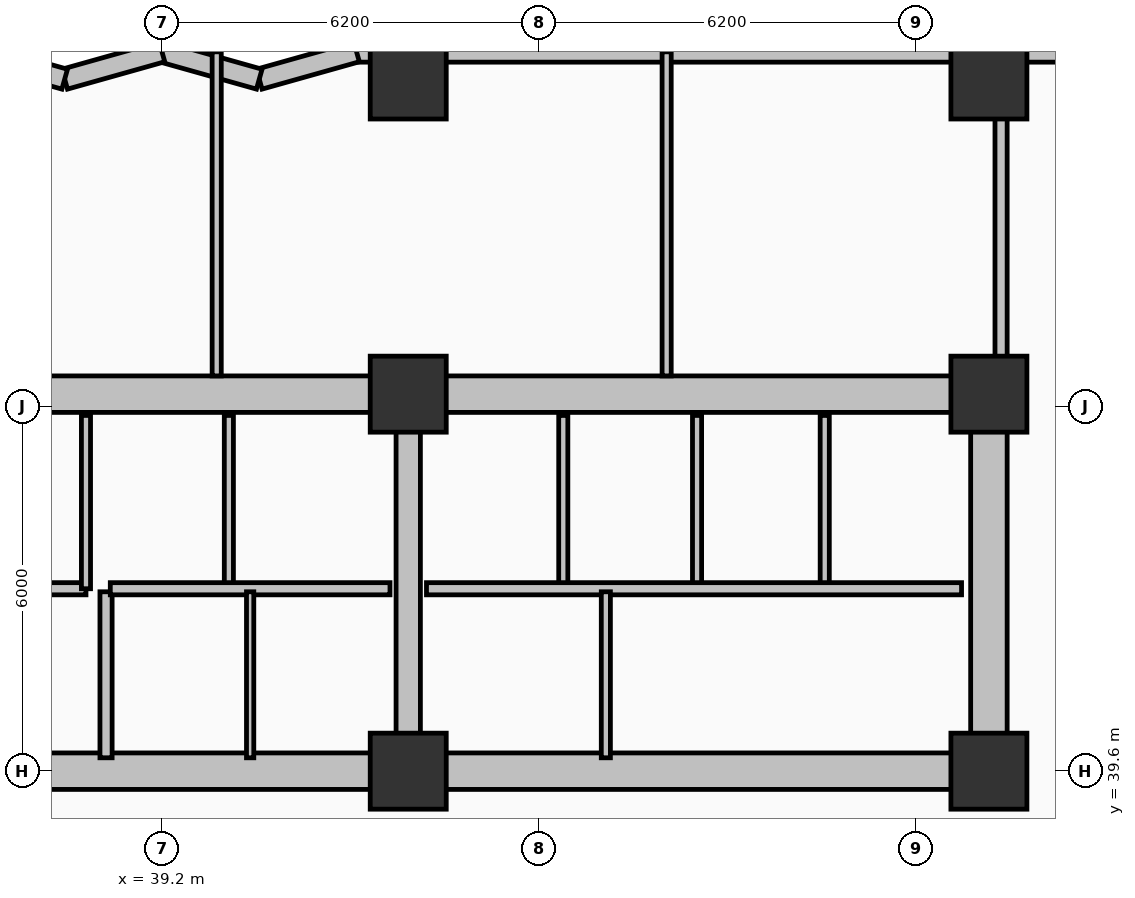
"""IFC4 building model, lengths in metres.
Left out: names, types, materials, properties, quantities, classifications, styles, units other than length and angle.
Written with IfcOpenShell. Run it as: python <this file> out.ifc"""

import sys

from ifc_helpers import new_model, si_unit, direction, frame, frame_2d, origin, origin_2d, place, context, subcontext, project, spatial, rectangle, extrude, element, fill, save


model = new_model("IFC4")
c1 = context("Model", 3, precision=1e-05, world=origin(), true_north=direction((0.0, 1.0)))
c2 = subcontext(c1, "Body", "Model", "MODEL_VIEW")
j1 = project(units=[si_unit("LENGTHUNIT", "METRE"), si_unit("PLANEANGLEUNIT", "RADIAN")], contexts=[c1])
p1 = place(None, origin())
s1 = spatial("IfcSite", under=j1, at=p1, CompositionType="ELEMENT")
p2 = place(p1, origin())
s2 = spatial("IfcBuilding", under=s1, at=p2, CompositionType="ELEMENT")
p3 = place(p2, frame((0.0, 0.0, 36.2)))
s3 = spatial("IfcBuildingStorey", under=s2, at=p3, CompositionType="ELEMENT", Elevation=36.2)
p4 = place(p3, frame((25.6, 45.8, 0.0), z_axis=(0.0, 0.0, 1.0), x_axis=(1.0, 0.0, 0.0)))
e1 = element("IfcWall", 1, at=p4, inside=s3, PredefinedType="SHEAR", context=c2, shape_type="SweptSolid", body=[
    extrude(rectangle(XDim=27.2, YDim=0.6, at=frame_2d((13.6, 0.0))), origin(), (0.0, 0.0, 1.0), 3.7),
])
p5 = place(p3, frame((52.8, 39.9, 0.0), z_axis=(0.0, 0.0, 1.0), x_axis=(0.0, 1.0, 0.0)))
e2 = element("IfcWall", 2, at=p5, inside=s3, PredefinedType="SHEAR", context=c2, shape_type="SweptSolid", body=[
    extrude(rectangle(XDim=5.6, YDim=0.6, at=frame_2d((2.8, 0.0))), origin(), (0.0, 0.0, 1.0), 3.7),
])
p6 = place(p3, frame((52.8, 39.6, 0.0), z_axis=(0.0, 0.0, 1.0), x_axis=(-1.0, 0.0, 0.0)))
e3 = element("IfcWall", 3, at=p6, inside=s3, PredefinedType="SHEAR", context=c2, shape_type="SweptSolid", body=[
    extrude(rectangle(XDim=27.2, YDim=0.6, at=frame_2d((13.6, 0.0))), origin(), (0.0, 0.0, 1.0), 3.7),
])
p7 = place(p6, frame((24.3, 0.0, 0.0)))
e4 = element("IfcOpeningElement", 4, at=p7, cuts=e3, PredefinedType="OPENING", context=c2, shape_type="SweptSolid", body=[
    extrude(rectangle(XDim=1.1, YDim=2.15, at=frame_2d((0.55, 1.075))), frame((0.0, 0.31, 0.0), z_axis=(0.0, -1.0, 0.0), x_axis=(1.0, 0.0, 0.0)), (0.0, 0.0, 1.0), 0.62),
])
p8 = place(p6, frame((21.85, 0.0, 0.0)))
e5 = element("IfcOpeningElement", 5, at=p8, cuts=e3, PredefinedType="OPENING", context=c2, shape_type="SweptSolid", body=[
    extrude(rectangle(XDim=0.85, YDim=2.1, at=frame_2d((0.425, 1.05))), frame((0.0, 0.31, 0.0), z_axis=(0.0, -1.0, 0.0), x_axis=(1.0, 0.0, 0.0)), (0.0, 0.0, 1.0), 0.62),
])
p9 = place(p6, frame((19.85, 0.0, 0.0)))
e6 = element("IfcOpeningElement", 6, at=p9, cuts=e3, PredefinedType="OPENING", context=c2, shape_type="SweptSolid", body=[
    extrude(rectangle(XDim=0.85, YDim=2.1, at=frame_2d((0.425, 1.05))), frame((0.0, 0.31, 0.0), z_axis=(0.0, -1.0, 0.0), x_axis=(1.0, 0.0, 0.0)), (0.0, 0.0, 1.0), 0.62),
])
p10 = place(p6, frame((15.1, 0.0, 0.0)))
e7 = element("IfcOpeningElement", 7, at=p10, cuts=e3, PredefinedType="OPENING", context=c2, shape_type="SweptSolid", body=[
    extrude(rectangle(XDim=1.2, YDim=2.15, at=frame_2d((0.6, 1.075))), frame((0.0, 0.31, 0.0), z_axis=(0.0, -1.0, 0.0), x_axis=(1.0, 0.0, 0.0)), (0.0, 0.0, 1.0), 0.62),
])
p11 = place(p6, frame((12.6, 0.0, 0.0)))
e8 = element("IfcOpeningElement", 8, at=p11, cuts=e3, PredefinedType="OPENING", context=c2, shape_type="SweptSolid", body=[
    extrude(rectangle(XDim=0.85, YDim=2.1, at=frame_2d((0.425, 1.05))), frame((0.0, 0.31, 0.0), z_axis=(0.0, -1.0, 0.0), x_axis=(1.0, 0.0, 0.0)), (0.0, 0.0, 1.0), 0.62),
])
p12 = place(p6, frame((10.85, 0.0, 0.0)))
e9 = element("IfcOpeningElement", 9, at=p12, cuts=e3, PredefinedType="OPENING", context=c2, shape_type="SweptSolid", body=[
    extrude(rectangle(XDim=0.85, YDim=2.1, at=frame_2d((0.425, 1.05))), frame((0.0, 0.31, 0.0), z_axis=(0.0, -1.0, 0.0), x_axis=(1.0, 0.0, 0.0)), (0.0, 0.0, 1.0), 0.62),
])
p13 = place(p6, frame((6.85, 0.0, 0.0)))
e10 = element("IfcOpeningElement", 10, at=p13, cuts=e3, PredefinedType="OPENING", context=c2, shape_type="SweptSolid", body=[
    extrude(rectangle(XDim=0.85, YDim=2.1, at=frame_2d((0.425, 1.05))), frame((0.0, 0.31, 0.0), z_axis=(0.0, -1.0, 0.0), x_axis=(1.0, 0.0, 0.0)), (0.0, 0.0, 1.0), 0.62),
])
p14 = place(p6, frame((2.0, 0.0, 0.0)))
e11 = element("IfcOpeningElement", 11, at=p14, cuts=e3, PredefinedType="OPENING", context=c2, shape_type="SweptSolid", body=[
    extrude(rectangle(XDim=0.85, YDim=2.1, at=frame_2d((0.425, 1.05))), frame((0.0, 0.31, 0.0), z_axis=(0.0, -1.0, 0.0), x_axis=(1.0, 0.0, 0.0)), (0.0, 0.0, 1.0), 0.62),
])
p15 = place(p3, frame((43.25, 39.9, 0.0), z_axis=(0.0, 0.0, 1.0), x_axis=(0.0, 1.0, 0.0)))
e12 = element("IfcWall", 12, at=p15, inside=s3, PredefinedType="SHEAR", context=c2, shape_type="SweptSolid", body=[
    extrude(rectangle(XDim=5.6, YDim=0.4, at=frame_2d((2.8, 0.0))), origin(), (0.0, 0.0, 1.0), 3.7),
])
for number, where, z_axis, x_axis in (
    (13, (43.25, 39.6, 0.0), (0.0, 0.0, 1.0), (1.0, 0.0, 0.0)),
    (14, (43.25, 45.8, 0.0), (0.0, 0.0, 1.0), (1.0, 0.0, 0.0)),
    (15, (52.8, 39.6, 0.0), (0.0, 0.0, 1.0), (1.0, 0.0, 0.0)),
    (16, (52.8, 45.8, 0.0), (0.0, 0.0, 1.0), (1.0, 0.0, 0.0)),
    (17, (43.25, 50.95, 0.0), (0.0, 0.0, 1.0), (1.0, 0.0, 0.0)),
    (18, (52.8, 50.95, 0.0), (0.0, 0.0, 1.0), (1.0, 0.0, 0.0)),
):
    element("IfcColumn", number, at=place(p3, frame(where, z_axis=z_axis, x_axis=x_axis)), inside=s3, PredefinedType="COLUMN", context=c2, shape_type="SweptSolid", body=[
        extrude(rectangle(XDim=1.25, YDim=1.25, at=origin_2d()), origin(), (0.0, 0.0, 1.0), 3.7),
    ])
p16 = place(p3, frame((59.8, 51.43, 0.0), z_axis=(0.0, 0.0, 1.0), x_axis=(-1.0, 0.0, 0.0)))
e19 = element("IfcWall", 19, at=p16, inside=s3, PredefinedType="SOLIDWALL", context=c2, shape_type="SweptSolid", body=[
    extrude(rectangle(XDim=17.4, YDim=0.34, at=frame_2d((8.7, 0.0))), origin(), (0.0, 0.0, 1.0), 2.7),
])
p17 = place(p16, frame((1.863, 0.0, 0.68)))
e20 = element("IfcOpeningElement", 20, at=p17, cuts=e19, PredefinedType="OPENING", context=c2, shape_type="SweptSolid", body=[
    extrude(rectangle(XDim=1.6, YDim=1.9, at=frame_2d((0.8, 0.95))), frame((0.0, 0.18, 0.0), z_axis=(0.0, -1.0, 0.0), x_axis=(1.0, 0.0, 0.0)), (0.0, 0.0, 1.0), 0.36),
])
p18 = place(p16, frame((9.913, 0.0, 0.68)))
e21 = element("IfcOpeningElement", 21, at=p18, cuts=e19, PredefinedType="OPENING", context=c2, shape_type="SweptSolid", body=[
    extrude(rectangle(XDim=1.6, YDim=1.9, at=frame_2d((0.8, 0.95))), frame((0.0, 0.18, 0.0), z_axis=(0.0, -1.0, 0.0), x_axis=(1.0, 0.0, 0.0)), (0.0, 0.0, 1.0), 0.36),
])
p19 = place(p16, frame((13.587, 0.0, 0.68)))
e22 = element("IfcOpeningElement", 22, at=p19, cuts=e19, PredefinedType="OPENING", context=c2, shape_type="SweptSolid", body=[
    extrude(rectangle(XDim=1.6, YDim=1.9, at=frame_2d((0.8, 0.95))), frame((0.0, 0.18, 0.0), z_axis=(0.0, -1.0, 0.0), x_axis=(1.0, 0.0, 0.0)), (0.0, 0.0, 1.0), 0.36),
])
p20 = place(p3, frame((42.4, 51.43, 0.0), z_axis=(0.0, 0.0, 1.0), x_axis=(-0.962652136636, -0.270741322725, 0.0)))
e23 = element("IfcWall", 23, at=p20, inside=s3, PredefinedType="SOLIDWALL", context=c2, shape_type="SweptSolid", body=[
    extrude(rectangle(XDim=1.662, YDim=0.34, at=frame_2d((0.831, 0.0))), origin(), (0.0, 0.0, 1.0), 2.7),
])
p21 = place(p3, frame((40.8, 50.98, 0.0), z_axis=(0.0, 0.0, 1.0), x_axis=(-0.962662902433, 0.270703040766, 0.0)))
e24 = element("IfcWall", 24, at=p21, inside=s3, PredefinedType="SOLIDWALL", context=c2, shape_type="SweptSolid", body=[
    extrude(rectangle(XDim=1.662, YDim=0.34, at=frame_2d((0.831, 0.0))), origin(), (0.0, 0.0, 1.0), 2.7),
])
p22 = place(p3, frame((39.2, 51.43, 0.0), z_axis=(0.0, 0.0, 1.0), x_axis=(-0.962652136636, -0.270741322725, 0.0)))
e25 = element("IfcWall", 25, at=p22, inside=s3, PredefinedType="SOLIDWALL", context=c2, shape_type="SweptSolid", body=[
    extrude(rectangle(XDim=1.662, YDim=0.34, at=frame_2d((0.831, 0.0))), origin(), (0.0, 0.0, 1.0), 2.7),
])
p23 = place(p3, frame((37.6, 50.98, 0.0), z_axis=(0.0, 0.0, 1.0), x_axis=(-0.962662902433, 0.270703040766, 0.0)))
e26 = element("IfcWall", 26, at=p23, inside=s3, PredefinedType="SOLIDWALL", context=c2, shape_type="SweptSolid", body=[
    extrude(rectangle(XDim=1.662, YDim=0.34, at=frame_2d((0.831, 0.0))), origin(), (0.0, 0.0, 1.0), 2.7),
])
p24 = place(p3, frame((37.95, 42.6, 0.0), z_axis=(0.0, 0.0, 1.0), x_axis=(-1.0, 0.0, 0.0)))
e27 = element("IfcWall", 27, at=p24, inside=s3, PredefinedType="PARTITIONING", context=c2, shape_type="SweptSolid", body=[
    extrude(rectangle(XDim=2.55, YDim=0.2, at=frame_2d((1.275, 0.0))), origin(), (0.0, 0.0, 1.0), 2.3),
])
p25 = place(p24, frame((0.75, 0.0, 0.0)))
e28 = element("IfcOpeningElement", 28, at=p25, cuts=e27, PredefinedType="OPENING", context=c2, shape_type="SweptSolid", body=[
    extrude(rectangle(XDim=1.1, YDim=2.15, at=frame_2d((0.55, 1.075))), frame((0.0, 0.11, 0.0), z_axis=(0.0, -1.0, 0.0), x_axis=(1.0, 0.0, 0.0)), (0.0, 0.0, 1.0), 0.22),
])
p26 = place(p3, frame((37.95, 42.6, 0.0), z_axis=(0.0, 0.0, 1.0), x_axis=(0.0, 1.0, 0.0)))
e29 = element("IfcWall", 29, at=p26, inside=s3, PredefinedType="PARTITIONING", context=c2, shape_type="SweptSolid", body=[
    extrude(rectangle(XDim=2.85, YDim=0.15, at=frame_2d((1.425, 0.0))), origin(), (0.0, 0.0, 1.0), 2.53),
])
p27 = place(p3, frame((38.28, 39.82, 0.0), z_axis=(0.0, 0.0, 1.0), x_axis=(0.0, 1.0, 0.0)))
e30 = element("IfcWall", 30, at=p27, inside=s3, PredefinedType="PARTITIONING", context=c2, shape_type="SweptSolid", body=[
    extrude(rectangle(XDim=2.73, YDim=0.2, at=frame_2d((1.365, 0.0))), origin(), (0.0, 0.0, 1.0), 2.53),
])
p28 = place(p3, frame((40.3, 42.65, 0.0), z_axis=(0.0, 0.0, 1.0), x_axis=(0.0, 1.0, 0.0)))
e31 = element("IfcWall", 31, at=p28, inside=s3, PredefinedType="PARTITIONING", context=c2, shape_type="SweptSolid", body=[
    extrude(rectangle(XDim=2.8, YDim=0.15, at=frame_2d((1.4, 0.0))), origin(), (0.0, 0.0, 1.0), 2.53),
])
p29 = place(p3, frame((42.95, 42.6, 0.0), z_axis=(0.0, 0.0, 1.0), x_axis=(-1.0, 0.0, 0.0)))
e32 = element("IfcWall", 32, at=p29, inside=s3, PredefinedType="PARTITIONING", context=c2, shape_type="SweptSolid", body=[
    extrude(rectangle(XDim=4.6, YDim=0.2, at=frame_2d((2.3, 0.0))), origin(), (0.0, 0.0, 1.0), 2.3),
])
p30 = place(p3, frame((40.65, 39.82, 0.0), z_axis=(0.0, 0.0, 1.0), x_axis=(0.0, 1.0, 0.0)))
e33 = element("IfcWall", 33, at=p30, inside=s3, PredefinedType="PARTITIONING", context=c2, shape_type="SweptSolid", body=[
    extrude(rectangle(XDim=2.73, YDim=0.12, at=frame_2d((1.365, 0.0))), origin(), (0.0, 0.0, 1.0), 2.53),
])
for number, where, z_axis, x_axis in (
    (34, (45.8, 42.65, 0.0), (0.0, 0.0, 1.0), (0.0, 1.0, 0.0)),
    (35, (48.0, 42.65, 0.0), (0.0, 0.0, 1.0), (0.0, 1.0, 0.0)),
    (36, (50.1, 42.65, 0.0), (0.0, 0.0, 1.0), (0.0, 1.0, 0.0)),
):
    element("IfcWall", number, at=place(p3, frame(where, z_axis=z_axis, x_axis=x_axis)), inside=s3, PredefinedType="PARTITIONING", context=c2, shape_type="SweptSolid", body=[
        extrude(rectangle(XDim=2.8, YDim=0.15, at=frame_2d((1.4, 0.0))), origin(), (0.0, 0.0, 1.0), 2.53),
    ])
p31 = place(p3, frame((52.35, 42.6, 0.0), z_axis=(0.0, 0.0, 1.0), x_axis=(-1.0, 0.0, 0.0)))
e37 = element("IfcWall", 37, at=p31, inside=s3, PredefinedType="PARTITIONING", context=c2, shape_type="SweptSolid", body=[
    extrude(rectangle(XDim=8.8, YDim=0.2, at=frame_2d((4.4, 0.0))), origin(), (0.0, 0.0, 1.0), 2.53),
])
p32 = place(p3, frame((46.5, 39.82, 0.0), z_axis=(0.0, 0.0, 1.0), x_axis=(0.0, 1.0, 0.0)))
e38 = element("IfcWall", 38, at=p32, inside=s3, PredefinedType="PARTITIONING", context=c2, shape_type="SweptSolid", body=[
    extrude(rectangle(XDim=2.73, YDim=0.15, at=frame_2d((1.365, 0.0))), origin(), (0.0, 0.0, 1.0), 2.53),
])
p33 = place(p3, frame((40.1, 46.1, 0.0), z_axis=(0.0, 0.0, 1.0), x_axis=(0.0, 1.0, 0.0)))
e39 = element("IfcWall", 39, at=p33, inside=s3, PredefinedType="PARTITIONING", context=c2, shape_type="SweptSolid", body=[
    extrude(rectangle(XDim=5.33, YDim=0.15, at=frame_2d((2.665, 0.0))), origin(), (0.0, 0.0, 1.0), 2.53),
])
p34 = place(p3, frame((47.5, 46.1, 0.0), z_axis=(0.0, 0.0, 1.0), x_axis=(0.0, 1.0, 0.0)))
e40 = element("IfcWall", 40, at=p34, inside=s3, PredefinedType="PARTITIONING", context=c2, shape_type="SweptSolid", body=[
    extrude(rectangle(XDim=5.33, YDim=0.15, at=frame_2d((2.665, 0.0))), origin(), (0.0, 0.0, 1.0), 2.53),
])
p35 = place(p34, frame((0.85, 0.0, 0.0)))
e41 = element("IfcOpeningElement", 41, at=p35, cuts=e40, PredefinedType="OPENING", context=c2, shape_type="SweptSolid", body=[
    extrude(rectangle(XDim=0.9, YDim=2.1, at=frame_2d((0.45, 1.05))), frame((0.0, 0.085, 0.0), z_axis=(0.0, -1.0, 0.0), x_axis=(1.0, 0.0, 0.0)), (0.0, 0.0, 1.0), 0.17),
])
p36 = place(p3, frame((53.0, 46.1, 0.0), z_axis=(0.0, 0.0, 1.0), x_axis=(0.0, 1.0, 0.0)))
e42 = element("IfcWall", 42, at=p36, inside=s3, PredefinedType="PARTITIONING", context=c2, shape_type="SweptSolid", body=[
    extrude(rectangle(XDim=4.38, YDim=0.2, at=frame_2d((2.19, 0.0))), origin(), (0.0, 0.0, 1.0), 2.53),
])
p37 = place(p36, frame((1.05, 0.0, 0.0)))
e43 = element("IfcOpeningElement", 43, at=p37, cuts=e42, PredefinedType="OPENING", context=c2, shape_type="SweptSolid", body=[
    extrude(rectangle(XDim=0.9, YDim=2.1, at=frame_2d((0.45, 1.05))), frame((0.0, 0.11, 0.0), z_axis=(0.0, -1.0, 0.0), x_axis=(1.0, 0.0, 0.0)), (0.0, 0.0, 1.0), 0.22),
])
p38 = place(p18, origin())
e44 = element("IfcWindow", 44, at=p38, inside=s3, PartitioningType="SINGLE_PANEL", PredefinedType="WINDOW", context=c2, shape_type="SweptSolid", body=[
    extrude(rectangle(XDim=1.6, YDim=1.9, at=frame_2d((0.8, 0.95))), frame((0.0, 0.03, 0.0), z_axis=(0.0, -1.0, 0.0), x_axis=(1.0, 0.0, 0.0)), (0.0, 0.0, 1.0), 0.06),
])
fill(e21, e44)
p39 = place(p19, origin())
e45 = element("IfcWindow", 45, at=p39, inside=s3, PartitioningType="SINGLE_PANEL", PredefinedType="WINDOW", context=c2, shape_type="SweptSolid", body=[
    extrude(rectangle(XDim=1.6, YDim=1.9, at=frame_2d((0.8, 0.95))), frame((0.0, 0.03, 0.0), z_axis=(0.0, -1.0, 0.0), x_axis=(1.0, 0.0, 0.0)), (0.0, 0.0, 1.0), 0.06),
])
fill(e22, e45)
p40 = place(p35, origin())
e46 = element("IfcDoor", 46, at=p40, inside=s3, OperationType="SINGLE_SWING_RIGHT", PredefinedType="DOOR", context=c2, shape_type="SweptSolid", body=[
    extrude(rectangle(XDim=0.9, YDim=2.1, at=frame_2d((0.45, 1.05))), frame((0.0, 0.025, 0.0), z_axis=(0.0, -1.0, 0.0), x_axis=(1.0, 0.0, 0.0)), (0.0, 0.0, 1.0), 0.05),
])
fill(e41, e46)
p41 = place(p37, origin())
e47 = element("IfcDoor", 47, at=p41, inside=s3, OperationType="SINGLE_SWING_LEFT", PredefinedType="DOOR", context=c2, shape_type="SweptSolid", body=[
    extrude(rectangle(XDim=0.9, YDim=2.1, at=frame_2d((0.45, 1.05))), frame((0.0, 0.025, 0.0), z_axis=(0.0, -1.0, 0.0), x_axis=(1.0, 0.0, 0.0)), (0.0, 0.0, 1.0), 0.05),
])
fill(e43, e47)
p42 = place(p10, origin())
e48 = element("IfcDoor", 48, at=p42, inside=s3, OperationType="SINGLE_SWING_RIGHT", PredefinedType="DOOR", context=c2, shape_type="SweptSolid", body=[
    extrude(rectangle(XDim=1.2, YDim=2.15, at=frame_2d((0.6, 1.075))), frame((0.0, 0.025, 0.0), z_axis=(0.0, -1.0, 0.0), x_axis=(1.0, 0.0, 0.0)), (0.0, 0.0, 1.0), 0.05),
])
fill(e7, e48)
p43 = place(p11, origin())
e49 = element("IfcDoor", 49, at=p43, inside=s3, OperationType="SINGLE_SWING_LEFT", PredefinedType="DOOR", context=c2, shape_type="SweptSolid", body=[
    extrude(rectangle(XDim=0.85, YDim=2.1, at=frame_2d((0.425, 1.05))), frame((0.0, 0.025, 0.0), z_axis=(0.0, -1.0, 0.0), x_axis=(1.0, 0.0, 0.0)), (0.0, 0.0, 1.0), 0.05),
])
fill(e8, e49)
p44 = place(p12, origin())
e50 = element("IfcDoor", 50, at=p44, inside=s3, OperationType="SINGLE_SWING_RIGHT", PredefinedType="DOOR", context=c2, shape_type="SweptSolid", body=[
    extrude(rectangle(XDim=0.85, YDim=2.1, at=frame_2d((0.425, 1.05))), frame((0.0, 0.025, 0.0), z_axis=(0.0, -1.0, 0.0), x_axis=(1.0, 0.0, 0.0)), (0.0, 0.0, 1.0), 0.05),
])
fill(e9, e50)
p45 = place(p13, origin())
e51 = element("IfcDoor", 51, at=p45, inside=s3, OperationType="SINGLE_SWING_LEFT", PredefinedType="DOOR", context=c2, shape_type="SweptSolid", body=[
    extrude(rectangle(XDim=0.85, YDim=2.1, at=frame_2d((0.425, 1.05))), frame((0.0, 0.025, 0.0), z_axis=(0.0, -1.0, 0.0), x_axis=(1.0, 0.0, 0.0)), (0.0, 0.0, 1.0), 0.05),
])
fill(e10, e51)
p46 = place(p14, origin())
e52 = element("IfcDoor", 52, at=p46, inside=s3, OperationType="SINGLE_SWING_RIGHT", PredefinedType="DOOR", context=c2, shape_type="SweptSolid", body=[
    extrude(rectangle(XDim=0.85, YDim=2.1, at=frame_2d((0.425, 1.05))), frame((0.0, 0.025, 0.0), z_axis=(0.0, -1.0, 0.0), x_axis=(1.0, 0.0, 0.0)), (0.0, 0.0, 1.0), 0.05),
])
fill(e11, e52)
save(model, sys.argv[1])
